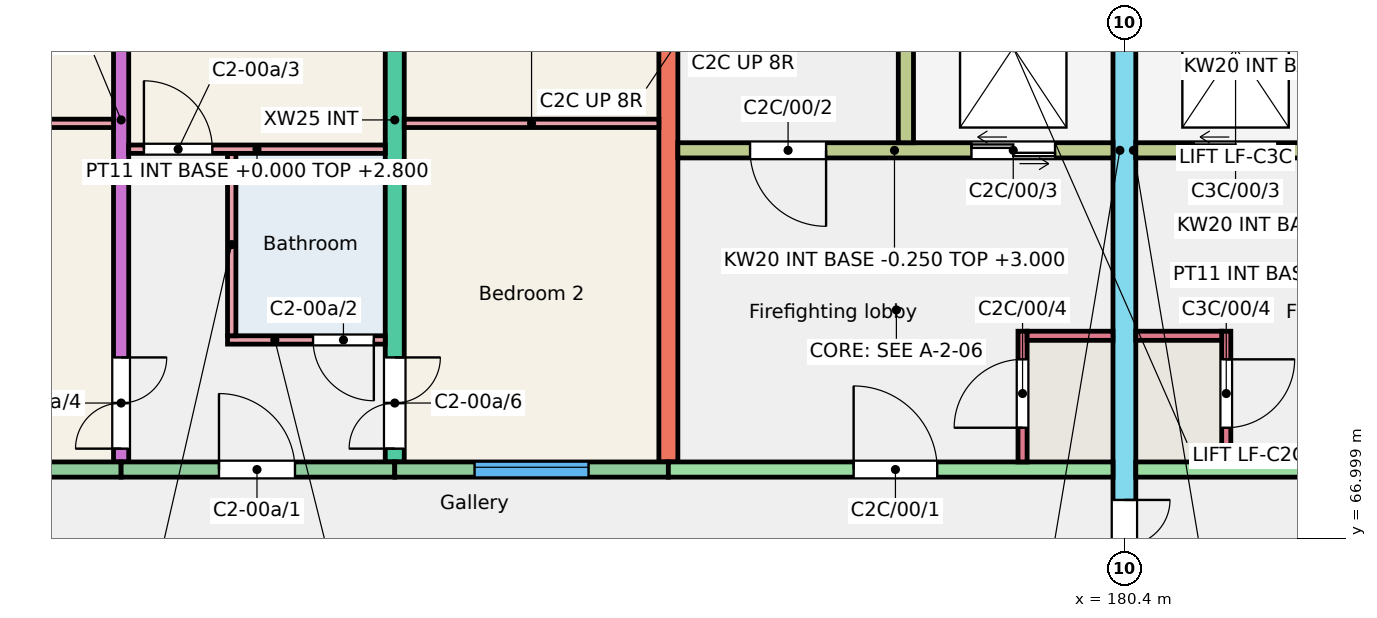
"""IFC4 building model, lengths in metres.
Left out: names, types, materials, properties, quantities, classifications, styles, units other than length and angle.
Written with IfcOpenShell. Run it as: python <this file> out.ifc"""

import sys

from ifc_helpers import new_model, si_unit, direction, frame, frame_2d, origin, place, context, subcontext, project, spatial, rectangle, extrude, element, fill, save


model = new_model("IFC4")
c1 = context("Model", 3, precision=1e-05, world=origin(), true_north=direction((0.0, 1.0)))
c2 = subcontext(c1, "Body", "Model", "MODEL_VIEW")
j1 = project(units=[si_unit("LENGTHUNIT", "METRE"), si_unit("PLANEANGLEUNIT", "RADIAN")], contexts=[c1])
p1 = place(None, origin())
s1 = spatial("IfcSite", under=j1, at=p1, CompositionType="ELEMENT")
p2 = place(p1, origin())
s2 = spatial("IfcBuilding", under=s1, at=p2, CompositionType="ELEMENT")
p3 = place(p2, origin())
s3 = spatial("IfcBuildingStorey", under=s2, at=p3, CompositionType="ELEMENT", Elevation=0.0)
p4 = place(p3, frame((167.2, 68.0, -0.25), z_axis=(0.0, 0.0, 1.0), x_axis=(0.0, 1.0, 0.0)))
e1 = element("IfcWall", 1, at=p4, inside=s3, PredefinedType="SHEAR", context=c2, shape_type="SweptSolid", body=[
    extrude(rectangle(XDim=9.0, YDim=0.2, at=frame_2d((4.5, 0.0))), origin(), (0.0, 0.0, 1.0), 3.25),
])
p5 = place(p4, frame((0.175, 0.0, 0.25)))
e2 = element("IfcOpeningElement", 2, at=p5, cuts=e1, PredefinedType="OPENING", context=c2, shape_type="SweptSolid", body=[
    extrude(rectangle(XDim=1.2, YDim=2.1, at=frame_2d((0.6, 1.05))), frame((0.0, 0.11, 0.0), z_axis=(0.0, -1.0, 0.0), x_axis=(1.0, 0.0, 0.0)), (0.0, 0.0, 1.0), 0.22),
])
p6 = place(p4, frame((6.4, 0.0, 0.25)))
e3 = element("IfcOpeningElement", 3, at=p6, cuts=e1, PredefinedType="OPENING", context=c2, shape_type="SweptSolid", body=[
    extrude(rectangle(XDim=1.2, YDim=2.1, at=frame_2d((0.6, 1.05))), frame((0.0, 0.11, 0.0), z_axis=(0.0, -1.0, 0.0), x_axis=(1.0, 0.0, 0.0)), (0.0, 0.0, 1.0), 0.22),
])
p7 = place(p3, frame((170.8, 68.0, -0.25), z_axis=(0.0, 0.0, 1.0), x_axis=(0.0, 1.0, 0.0)))
e4 = element("IfcWall", 4, at=p7, inside=s3, PredefinedType="SHEAR", context=c2, shape_type="SweptSolid", body=[
    extrude(rectangle(XDim=9.0, YDim=0.25, at=frame_2d((4.5, 0.0))), origin(), (0.0, 0.0, 1.0), 3.25),
])
p8 = place(p7, frame((0.175, 0.0, 0.25)))
e5 = element("IfcOpeningElement", 5, at=p8, cuts=e4, PredefinedType="OPENING", context=c2, shape_type="SweptSolid", body=[
    extrude(rectangle(XDim=1.2, YDim=2.1, at=frame_2d((0.6, 1.05))), frame((0.0, 0.135, 0.0), z_axis=(0.0, -1.0, 0.0), x_axis=(1.0, 0.0, 0.0)), (0.0, 0.0, 1.0), 0.27),
])
p9 = place(p7, frame((6.4, 0.0, 0.25)))
e6 = element("IfcOpeningElement", 6, at=p9, cuts=e4, PredefinedType="OPENING", context=c2, shape_type="SweptSolid", body=[
    extrude(rectangle(XDim=1.2, YDim=2.1, at=frame_2d((0.6, 1.05))), frame((0.0, 0.135, 0.0), z_axis=(0.0, -1.0, 0.0), x_axis=(1.0, 0.0, 0.0)), (0.0, 0.0, 1.0), 0.27),
])
p10 = place(p3, frame((174.4, 68.0, -0.25), z_axis=(0.0, 0.0, 1.0), x_axis=(0.0, 1.0, 0.0)))
e7 = element("IfcWall", 7, at=p10, inside=s3, PredefinedType="SHEAR", context=c2, shape_type="SweptSolid", body=[
    extrude(rectangle(XDim=9.0, YDim=0.25, at=frame_2d((4.5, 0.0))), origin(), (0.0, 0.0, 1.0), 3.25),
])
p11 = place(p3, frame((180.4, 66.0, -0.25), z_axis=(0.0, 0.0, 1.0), x_axis=(0.0, 1.0, 0.0)))
e8 = element("IfcWall", 8, at=p11, inside=s3, PredefinedType="SHEAR", context=c2, shape_type="SweptSolid", body=[
    extrude(rectangle(XDim=11.0, YDim=0.3, at=frame_2d((5.5, 0.0))), origin(), (0.0, 0.0, 1.0), 3.25),
])
p12 = place(p11, frame((0.3, 0.0, 0.25)))
e9 = element("IfcOpeningElement", 9, at=p12, cuts=e8, PredefinedType="OPENING", context=c2, shape_type="SweptSolid", body=[
    extrude(rectangle(XDim=1.2, YDim=2.1, at=frame_2d((0.6, 1.05))), frame((0.0, 0.16, 0.0), z_axis=(0.0, -1.0, 0.0), x_axis=(1.0, 0.0, 0.0)), (0.0, 0.0, 1.0), 0.32),
])
p13 = place(p3, frame((163.75, 67.9, -0.25), z_axis=(0.0, 0.0, 1.0), x_axis=(1.0, 0.0, 0.0)))
e10 = element("IfcWall", 10, at=p13, inside=s3, PredefinedType="SOLIDWALL", context=c2, shape_type="SweptSolid", body=[
    extrude(rectangle(XDim=3.45, YDim=0.2, at=frame_2d((1.725, 0.0))), origin(), (0.0, 0.0, 1.0), 3.25),
])
p14 = place(p13, frame((0.925, 0.0, 1.15)))
e11 = element("IfcOpeningElement", 11, at=p14, cuts=e10, PredefinedType="OPENING", context=c2, shape_type="SweptSolid", body=[
    extrude(rectangle(XDim=1.5, YDim=1.5, at=frame_2d((0.75, 0.75))), frame((0.0, 0.11, 0.0), z_axis=(0.0, -1.0, 0.0), x_axis=(1.0, 0.0, 0.0)), (0.0, 0.0, 1.0), 0.22),
])
p15 = place(p3, frame((167.2, 67.9, -0.25), z_axis=(0.0, 0.0, 1.0), x_axis=(1.0, 0.0, 0.0)))
e12 = element("IfcWall", 12, at=p15, inside=s3, PredefinedType="SOLIDWALL", context=c2, shape_type="SweptSolid", body=[
    extrude(rectangle(XDim=3.6, YDim=0.2, at=frame_2d((1.8, 0.0))), origin(), (0.0, 0.0, 1.0), 3.25),
])
p16 = place(p15, frame((1.288, 0.0, 0.25)))
e13 = element("IfcOpeningElement", 13, at=p16, cuts=e12, PredefinedType="OPENING", context=c2, shape_type="SweptSolid", body=[
    extrude(rectangle(XDim=1.0, YDim=2.1, at=frame_2d((0.5, 1.05))), frame((0.0, 0.11, 0.0), z_axis=(0.0, -1.0, 0.0), x_axis=(1.0, 0.0, 0.0)), (0.0, 0.0, 1.0), 0.22),
])
p17 = place(p3, frame((170.8, 67.9, -0.25), z_axis=(0.0, 0.0, 1.0), x_axis=(1.0, 0.0, 0.0)))
e14 = element("IfcWall", 14, at=p17, inside=s3, PredefinedType="SOLIDWALL", context=c2, shape_type="SweptSolid", body=[
    extrude(rectangle(XDim=3.6, YDim=0.2, at=frame_2d((1.8, 0.0))), origin(), (0.0, 0.0, 1.0), 3.25),
])
p18 = place(p17, frame((1.05, 0.0, 1.15)))
e15 = element("IfcOpeningElement", 15, at=p18, cuts=e14, PredefinedType="OPENING", context=c2, shape_type="SweptSolid", body=[
    extrude(rectangle(XDim=1.5, YDim=1.5, at=frame_2d((0.75, 0.75))), frame((0.0, 0.11, 0.0), z_axis=(0.0, -1.0, 0.0), x_axis=(1.0, 0.0, 0.0)), (0.0, 0.0, 1.0), 0.22),
])
p19 = place(p3, frame((174.4, 67.9, -0.25), z_axis=(0.0, 0.0, 1.0), x_axis=(1.0, 0.0, 0.0)))
e16 = element("IfcWall", 16, at=p19, inside=s3, PredefinedType="SHEAR", context=c2, shape_type="SweptSolid", body=[
    extrude(rectangle(XDim=5.85, YDim=0.2, at=frame_2d((2.925, 0.0))), origin(), (0.0, 0.0, 1.0), 3.25),
])
p20 = place(p19, frame((2.438, 0.0, 0.25)))
e17 = element("IfcOpeningElement", 17, at=p20, cuts=e16, PredefinedType="OPENING", context=c2, shape_type="SweptSolid", body=[
    extrude(rectangle(XDim=1.1, YDim=2.1, at=frame_2d((0.55, 1.05))), frame((0.0, 0.11, 0.0), z_axis=(0.0, -1.0, 0.0), x_axis=(1.0, 0.0, 0.0)), (0.0, 0.0, 1.0), 0.22),
])
p21 = place(p3, frame((174.525, 72.1, -0.25), z_axis=(0.0, 0.0, 1.0), x_axis=(1.0, 0.0, 0.0)))
e18 = element("IfcWall", 18, at=p21, inside=s3, PredefinedType="SHEAR", context=c2, shape_type="SweptSolid", body=[
    extrude(rectangle(XDim=5.725, YDim=0.2, at=frame_2d((2.863, 0.0))), origin(), (0.0, 0.0, 1.0), 3.25),
])
p22 = place(p21, frame((0.95, 0.0, 0.25)))
e19 = element("IfcOpeningElement", 19, at=p22, cuts=e18, PredefinedType="OPENING", context=c2, shape_type="SweptSolid", body=[
    extrude(rectangle(XDim=1.0, YDim=2.1, at=frame_2d((0.5, 1.05))), frame((0.0, 0.11, 0.0), z_axis=(0.0, -1.0, 0.0), x_axis=(1.0, 0.0, 0.0)), (0.0, 0.0, 1.0), 0.22),
])
p23 = place(p21, frame((3.863, 0.0, 0.25)))
e20 = element("IfcOpeningElement", 20, at=p23, cuts=e18, PredefinedType="OPENING", context=c2, shape_type="SweptSolid", body=[
    extrude(rectangle(XDim=1.1, YDim=2.1, at=frame_2d((0.55, 1.05))), frame((0.0, 0.11, 0.0), z_axis=(0.0, -1.0, 0.0), x_axis=(1.0, 0.0, 0.0)), (0.0, 0.0, 1.0), 0.22),
])
p24 = place(p3, frame((177.525, 72.2, -0.25), z_axis=(0.0, 0.0, 1.0), x_axis=(0.0, 1.0, 0.0)))
e21 = element("IfcWall", 21, at=p24, inside=s3, PredefinedType="SHEAR", context=c2, shape_type="SweptSolid", body=[
    extrude(rectangle(XDim=4.8, YDim=0.2, at=frame_2d((2.4, 0.0))), origin(), (0.0, 0.0, 1.0), 3.25),
])
p25 = place(p3, frame((179.06, 68.0, -0.25), z_axis=(0.0, 0.0, 1.0), x_axis=(0.0, 1.0, 0.0)))
e22 = element("IfcWall", 22, at=p25, inside=s3, PredefinedType="SHEAR", context=c2, shape_type="SweptSolid", body=[
    extrude(rectangle(XDim=1.72, YDim=0.12, at=frame_2d((0.86, 0.0))), origin(), (0.0, 0.0, 1.0), 3.25),
])
p26 = place(p25, frame((0.45, 0.0, 0.25)))
e23 = element("IfcOpeningElement", 23, at=p26, cuts=e22, PredefinedType="OPENING", context=c2, shape_type="SweptSolid", body=[
    extrude(rectangle(XDim=0.9, YDim=2.1, at=frame_2d((0.45, 1.05))), frame((0.0, 0.07, 0.0), z_axis=(0.0, -1.0, 0.0), x_axis=(1.0, 0.0, 0.0)), (0.0, 0.0, 1.0), 0.14),
])
p27 = place(p3, frame((179.12, 69.66, -0.25), z_axis=(0.0, 0.0, 1.0), x_axis=(1.0, 0.0, 0.0)))
e24 = element("IfcWall", 24, at=p27, inside=s3, PredefinedType="SHEAR", context=c2, shape_type="SweptSolid", body=[
    extrude(rectangle(XDim=1.13, YDim=0.12, at=frame_2d((0.565, 0.0))), origin(), (0.0, 0.0, 1.0), 3.25),
])
p28 = place(p3, frame((180.55, 67.9, -0.25), z_axis=(0.0, 0.0, 1.0), x_axis=(1.0, 0.0, 0.0)))
e25 = element("IfcWall", 25, at=p28, inside=s3, PredefinedType="SHEAR", context=c2, shape_type="SweptSolid", body=[
    extrude(rectangle(XDim=5.85, YDim=0.2, at=frame_2d((2.925, 0.0))), origin(), (0.0, 0.0, 1.0), 3.25),
])
p29 = place(p28, frame((2.312, 0.0, 0.25)))
e26 = element("IfcOpeningElement", 26, at=p29, cuts=e25, PredefinedType="OPENING", context=c2, shape_type="SweptSolid", body=[
    extrude(rectangle(XDim=1.1, YDim=2.1, at=frame_2d((0.55, 1.05))), frame((0.0, 0.11, 0.0), z_axis=(0.0, -1.0, 0.0), x_axis=(1.0, 0.0, 0.0)), (0.0, 0.0, 1.0), 0.22),
])
p30 = place(p3, frame((180.55, 72.1, -0.25), z_axis=(0.0, 0.0, 1.0), x_axis=(1.0, 0.0, 0.0)))
e27 = element("IfcWall", 27, at=p30, inside=s3, PredefinedType="SHEAR", context=c2, shape_type="SweptSolid", body=[
    extrude(rectangle(XDim=5.725, YDim=0.2, at=frame_2d((2.862, 0.0))), origin(), (0.0, 0.0, 1.0), 3.25),
])
p31 = place(p30, frame((3.775, 0.0, 0.25)))
e28 = element("IfcOpeningElement", 28, at=p31, cuts=e27, PredefinedType="OPENING", context=c2, shape_type="SweptSolid", body=[
    extrude(rectangle(XDim=1.0, YDim=2.1, at=frame_2d((0.5, 1.05))), frame((0.0, 0.11, 0.0), z_axis=(0.0, -1.0, 0.0), x_axis=(1.0, 0.0, 0.0)), (0.0, 0.0, 1.0), 0.22),
])
p32 = place(p30, frame((0.762, 0.0, 0.25)))
e29 = element("IfcOpeningElement", 29, at=p32, cuts=e27, PredefinedType="OPENING", context=c2, shape_type="SweptSolid", body=[
    extrude(rectangle(XDim=1.1, YDim=2.1, at=frame_2d((0.55, 1.05))), frame((0.0, 0.11, 0.0), z_axis=(0.0, -1.0, 0.0), x_axis=(1.0, 0.0, 0.0)), (0.0, 0.0, 1.0), 0.22),
])
p33 = place(p3, frame((181.74, 68.0, -0.25), z_axis=(0.0, 0.0, 1.0), x_axis=(0.0, 1.0, 0.0)))
e30 = element("IfcWall", 30, at=p33, inside=s3, PredefinedType="SHEAR", context=c2, shape_type="SweptSolid", body=[
    extrude(rectangle(XDim=1.72, YDim=0.12, at=frame_2d((0.86, 0.0))), origin(), (0.0, 0.0, 1.0), 3.25),
])
p34 = place(p33, frame((0.45, 0.0, 0.25)))
e31 = element("IfcOpeningElement", 31, at=p34, cuts=e30, PredefinedType="OPENING", context=c2, shape_type="SweptSolid", body=[
    extrude(rectangle(XDim=0.9, YDim=2.1, at=frame_2d((0.45, 1.05))), frame((0.0, 0.07, 0.0), z_axis=(0.0, -1.0, 0.0), x_axis=(1.0, 0.0, 0.0)), (0.0, 0.0, 1.0), 0.14),
])
p35 = place(p3, frame((180.55, 69.66, -0.25), z_axis=(0.0, 0.0, 1.0), x_axis=(1.0, 0.0, 0.0)))
e32 = element("IfcWall", 32, at=p35, inside=s3, PredefinedType="SHEAR", context=c2, shape_type="SweptSolid", body=[
    extrude(rectangle(XDim=1.13, YDim=0.12, at=frame_2d((0.565, 0.0))), origin(), (0.0, 0.0, 1.0), 3.25),
])
p36 = place(p3, frame((177.425, 72.1, -1.4), z_axis=(0.0, 0.0, 1.0), x_axis=(1.0, 0.0, 0.0)))
e33 = element("IfcWall", 33, at=p36, inside=s3, PredefinedType="SHEAR", context=c2, shape_type="SweptSolid", body=[
    extrude(rectangle(XDim=2.975, YDim=0.2, at=frame_2d((1.487, 0.0))), origin(), (0.0, 0.0, 1.0), 1.15),
])
p37 = place(p3, frame((177.525, 72.2, -1.4), z_axis=(0.0, 0.0, 1.0), x_axis=(0.0, 1.0, 0.0)))
e34 = element("IfcWall", 34, at=p37, inside=s3, PredefinedType="SHEAR", context=c2, shape_type="SweptSolid", body=[
    extrude(rectangle(XDim=3.0, YDim=0.2, at=frame_2d((1.5, 0.0))), origin(), (0.0, 0.0, 1.0), 1.15),
])
p38 = place(p3, frame((180.325, 72.2, -1.4), z_axis=(0.0, 0.0, 1.0), x_axis=(0.0, 1.0, 0.0)))
e35 = element("IfcWall", 35, at=p38, inside=s3, PredefinedType="SHEAR", context=c2, shape_type="SweptSolid", body=[
    extrude(rectangle(XDim=3.0, YDim=0.15, at=frame_2d((1.5, 0.0))), origin(), (0.0, 0.0, 1.0), 1.15),
])
p39 = place(p3, frame((180.4, 72.1, -1.4), z_axis=(0.0, 0.0, 1.0), x_axis=(1.0, 0.0, 0.0)))
e36 = element("IfcWall", 36, at=p39, inside=s3, PredefinedType="SHEAR", context=c2, shape_type="SweptSolid", body=[
    extrude(rectangle(XDim=2.975, YDim=0.2, at=frame_2d((1.488, 0.0))), origin(), (0.0, 0.0, 1.0), 1.15),
])
p40 = place(p3, frame((180.475, 72.2, -1.4), z_axis=(0.0, 0.0, 1.0), x_axis=(0.0, 1.0, 0.0)))
e37 = element("IfcWall", 37, at=p40, inside=s3, PredefinedType="SHEAR", context=c2, shape_type="SweptSolid", body=[
    extrude(rectangle(XDim=3.0, YDim=0.15, at=frame_2d((1.5, 0.0))), origin(), (0.0, 0.0, 1.0), 1.15),
])
p41 = place(p3, frame((168.6, 69.605, 0.0), z_axis=(0.0, 0.0, 1.0), x_axis=(1.0, 0.0, 0.0)))
e38 = element("IfcWall", 38, at=p41, inside=s3, PredefinedType="PARTITIONING", context=c2, shape_type="SweptSolid", body=[
    extrude(rectangle(XDim=2.075, YDim=0.11, at=frame_2d((1.038, 0.0))), origin(), (0.0, 0.0, 1.0), 2.8),
])
p42 = place(p41, frame((1.125, 0.0, 0.0)))
e39 = element("IfcOpeningElement", 39, at=p42, cuts=e38, PredefinedType="OPENING", context=c2, shape_type="SweptSolid", body=[
    extrude(rectangle(XDim=0.8, YDim=2.1, at=frame_2d((0.4, 1.05))), frame((0.0, 0.065, 0.0), z_axis=(0.0, -1.0, 0.0), x_axis=(1.0, 0.0, 0.0)), (0.0, 0.0, 1.0), 0.13),
])
p43 = place(p3, frame((168.655, 69.66, 0.0), z_axis=(0.0, 0.0, 1.0), x_axis=(0.0, 1.0, 0.0)))
e40 = element("IfcWall", 40, at=p43, inside=s3, PredefinedType="PARTITIONING", context=c2, shape_type="SweptSolid", body=[
    extrude(rectangle(XDim=2.4, YDim=0.11, at=frame_2d((1.2, 0.0))), origin(), (0.0, 0.0, 1.0), 2.8),
])
p44 = place(p3, frame((167.3, 72.115, 0.0), z_axis=(0.0, 0.0, 1.0), x_axis=(1.0, 0.0, 0.0)))
e41 = element("IfcWall", 41, at=p44, inside=s3, PredefinedType="PARTITIONING", context=c2, shape_type="SweptSolid", body=[
    extrude(rectangle(XDim=3.375, YDim=0.11, at=frame_2d((1.688, 0.0))), origin(), (0.0, 0.0, 1.0), 2.8),
])
p45 = place(p44, frame((0.2, 0.0, 0.0)))
e42 = element("IfcOpeningElement", 42, at=p45, cuts=e41, PredefinedType="OPENING", context=c2, shape_type="SweptSolid", body=[
    extrude(rectangle(XDim=0.9, YDim=2.1, at=frame_2d((0.45, 1.05))), frame((0.0, 0.065, 0.0), z_axis=(0.0, -1.0, 0.0), x_axis=(1.0, 0.0, 0.0)), (0.0, 0.0, 1.0), 0.13),
])
p46 = place(p3, frame((163.75, 72.455, 0.0), z_axis=(0.0, 0.0, 1.0), x_axis=(1.0, 0.0, 0.0)))
e43 = element("IfcWall", 43, at=p46, inside=s3, PredefinedType="PARTITIONING", context=c2, shape_type="SweptSolid", body=[
    extrude(rectangle(XDim=3.35, YDim=0.11, at=frame_2d((1.675, 0.0))), origin(), (0.0, 0.0, 1.0), 2.8),
])
p47 = place(p3, frame((170.925, 72.455, 0.0), z_axis=(0.0, 0.0, 1.0), x_axis=(1.0, 0.0, 0.0)))
e44 = element("IfcWall", 44, at=p47, inside=s3, PredefinedType="PARTITIONING", context=c2, shape_type="SweptSolid", body=[
    extrude(rectangle(XDim=3.35, YDim=0.11, at=frame_2d((1.675, 0.0))), origin(), (0.0, 0.0, 1.0), 2.8),
])
p48 = place(p18, origin())
e45 = element("IfcWindow", 45, at=p48, inside=s3, PartitioningType="SINGLE_PANEL", PredefinedType="WINDOW", context=c2, shape_type="SweptSolid", body=[
    extrude(rectangle(XDim=1.5, YDim=1.5, at=frame_2d((0.75, 0.75))), frame((0.0, 0.06, 0.0), z_axis=(0.0, -1.0, 0.0), x_axis=(1.0, 0.0, 0.0)), (0.0, 0.0, 1.0), 0.06),
])
fill(e15, e45)
p49 = place(p16, origin())
e46 = element("IfcDoor", 46, at=p49, inside=s3, OperationType="SINGLE_SWING_LEFT", PredefinedType="DOOR", context=c2, shape_type="SweptSolid", body=[
    extrude(rectangle(XDim=1.0, YDim=2.1, at=frame_2d((0.5, 1.05))), frame((0.0, 0.025, 0.0), z_axis=(0.0, -1.0, 0.0), x_axis=(1.0, 0.0, 0.0)), (0.0, 0.0, 1.0), 0.05),
])
fill(e13, e46)
p50 = place(p42, origin())
e47 = element("IfcDoor", 47, at=p50, inside=s3, OperationType="SINGLE_SWING_RIGHT", PredefinedType="DOOR", context=c2, shape_type="SweptSolid", body=[
    extrude(rectangle(XDim=0.8, YDim=2.1, at=frame_2d((0.4, 1.05))), frame((0.0, 0.025, 0.0), z_axis=(0.0, -1.0, 0.0), x_axis=(1.0, 0.0, 0.0)), (0.0, 0.0, 1.0), 0.05),
])
fill(e39, e47)
p51 = place(p45, origin())
e48 = element("IfcDoor", 48, at=p51, inside=s3, OperationType="SINGLE_SWING_LEFT", PredefinedType="DOOR", context=c2, shape_type="SweptSolid", body=[
    extrude(rectangle(XDim=0.9, YDim=2.1, at=frame_2d((0.45, 1.05))), frame((0.0, 0.025, 0.0), z_axis=(0.0, -1.0, 0.0), x_axis=(1.0, 0.0, 0.0)), (0.0, 0.0, 1.0), 0.05),
])
fill(e42, e48)
p52 = place(p5, origin())
e49 = element("IfcDoor", 49, at=p52, inside=s3, OperationType="DOUBLE_DOOR_SINGLE_SWING", PredefinedType="DOOR", context=c2, shape_type="SweptSolid", body=[
    extrude(rectangle(XDim=1.2, YDim=2.1, at=frame_2d((0.6, 1.05))), frame((0.0, 0.025, 0.0), z_axis=(0.0, -1.0, 0.0), x_axis=(1.0, 0.0, 0.0)), (0.0, 0.0, 1.0), 0.05),
])
fill(e2, e49)
p53 = place(p8, origin())
e50 = element("IfcDoor", 50, at=p53, inside=s3, OperationType="DOUBLE_DOOR_SINGLE_SWING", PredefinedType="DOOR", context=c2, shape_type="SweptSolid", body=[
    extrude(rectangle(XDim=1.2, YDim=2.1, at=frame_2d((0.6, 1.05))), frame((0.0, 0.025, 0.0), z_axis=(0.0, -1.0, 0.0), x_axis=(1.0, 0.0, 0.0)), (0.0, 0.0, 1.0), 0.05),
])
fill(e5, e50)
p54 = place(p20, origin())
e51 = element("IfcDoor", 51, at=p54, inside=s3, OperationType="SINGLE_SWING_LEFT", PredefinedType="DOOR", context=c2, shape_type="SweptSolid", body=[
    extrude(rectangle(XDim=1.1, YDim=2.1, at=frame_2d((0.55, 1.05))), frame((0.0, 0.025, 0.0), z_axis=(0.0, -1.0, 0.0), x_axis=(1.0, 0.0, 0.0)), (0.0, 0.0, 1.0), 0.05),
])
fill(e17, e51)
p55 = place(p22, origin())
e52 = element("IfcDoor", 52, at=p55, inside=s3, OperationType="SINGLE_SWING_RIGHT", PredefinedType="DOOR", context=c2, shape_type="SweptSolid", body=[
    extrude(rectangle(XDim=1.0, YDim=2.1, at=frame_2d((0.5, 1.05))), frame((0.0, 0.025, 0.0), z_axis=(0.0, -1.0, 0.0), x_axis=(1.0, 0.0, 0.0)), (0.0, 0.0, 1.0), 0.05),
])
fill(e19, e52)
p56 = place(p23, origin())
e53 = element("IfcDoor", 53, at=p56, inside=s3, OperationType="DOUBLE_DOOR_SLIDING", PredefinedType="DOOR", context=c2, shape_type="SweptSolid", body=[
    extrude(rectangle(XDim=1.1, YDim=2.1, at=frame_2d((0.55, 1.05))), frame((0.0, 0.025, 0.0), z_axis=(0.0, -1.0, 0.0), x_axis=(1.0, 0.0, 0.0)), (0.0, 0.0, 1.0), 0.05),
])
fill(e20, e53)
p57 = place(p26, origin())
e54 = element("IfcDoor", 54, at=p57, inside=s3, OperationType="SINGLE_SWING_LEFT", PredefinedType="DOOR", context=c2, shape_type="SweptSolid", body=[
    extrude(rectangle(XDim=0.9, YDim=2.1, at=frame_2d((0.45, 1.05))), frame((0.0, 0.025, 0.0), z_axis=(0.0, -1.0, 0.0), x_axis=(1.0, 0.0, 0.0)), (0.0, 0.0, 1.0), 0.05),
])
fill(e23, e54)
p58 = place(p32, origin())
e55 = element("IfcDoor", 55, at=p58, inside=s3, OperationType="DOUBLE_DOOR_SLIDING", PredefinedType="DOOR", context=c2, shape_type="SweptSolid", body=[
    extrude(rectangle(XDim=1.1, YDim=2.1, at=frame_2d((0.55, 1.05))), frame((0.0, 0.025, 0.0), z_axis=(0.0, -1.0, 0.0), x_axis=(1.0, 0.0, 0.0)), (0.0, 0.0, 1.0), 0.05),
])
fill(e29, e55)
p59 = place(p34, origin())
e56 = element("IfcDoor", 56, at=p59, inside=s3, OperationType="SINGLE_SWING_RIGHT", PredefinedType="DOOR", context=c2, shape_type="SweptSolid", body=[
    extrude(rectangle(XDim=0.9, YDim=2.1, at=frame_2d((0.45, 1.05))), frame((0.0, 0.025, 0.0), z_axis=(0.0, -1.0, 0.0), x_axis=(1.0, 0.0, 0.0)), (0.0, 0.0, 1.0), 0.05),
])
fill(e31, e56)
p60 = place(p12, origin())
e57 = element("IfcDoor", 57, at=p60, inside=s3, OperationType="DOUBLE_DOOR_SINGLE_SWING", PredefinedType="DOOR", context=c2, shape_type="SweptSolid", body=[
    extrude(rectangle(XDim=1.2, YDim=2.1, at=frame_2d((0.6, 1.05))), frame((0.0, 0.025, 0.0), z_axis=(0.0, -1.0, 0.0), x_axis=(1.0, 0.0, 0.0)), (0.0, 0.0, 1.0), 0.05),
])
fill(e9, e57)
save(model, sys.argv[1])
